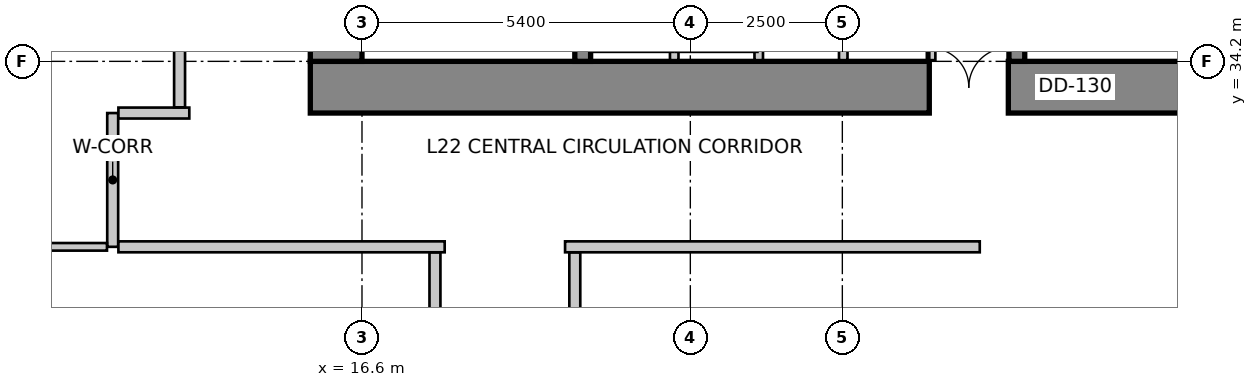
"""IFC4 building model, lengths in metres.
Left out: names, types, materials, properties, quantities, classifications, styles, units other than length and angle.
Written with IfcOpenShell. Run it as: python <this file> out.ifc"""

import sys

from ifc_helpers import new_model, si_unit, direction, frame, frame_2d, origin, place, context, subcontext, project, spatial, rectangle, extrude, source, transform, mapped, element, fill, save


model = new_model("IFC4")
c1 = context("Model", 3, precision=1e-05, world=origin(), true_north=direction((0.0, 1.0)))
c2 = subcontext(c1, "Body", "Model", "MODEL_VIEW")
j1 = project(units=[si_unit("LENGTHUNIT", "METRE"), si_unit("PLANEANGLEUNIT", "RADIAN")], contexts=[c1])
p1 = place(None, origin())
s1 = spatial("IfcSite", under=j1, at=p1, CompositionType="ELEMENT")
p2 = place(p1, origin())
s2 = spatial("IfcBuilding", under=s1, at=p2, CompositionType="ELEMENT")
p3 = place(p2, frame((0.0, 0.0, 91.0)))
s3 = spatial("IfcBuildingStorey", under=s2, at=p3, CompositionType="ELEMENT", Elevation=91.0)
p4 = place(p3, frame((15.75, 33.775, 0.0), z_axis=(0.0, 0.0, 1.0), x_axis=(1.0, 0.0, 0.0)))
e1 = element("IfcWall", 1, at=p4, inside=s3, PredefinedType="SHEAR", context=c2, shape_type="SweptSolid", body=[
    extrude(rectangle(XDim=16.1, YDim=0.85, at=frame_2d((8.05, 0.0))), origin(), (0.0, 0.0, 1.0), 4.0),
])
m1 = source(origin(), c2, "Body", "SweptSolid", [
    extrude(rectangle(XDim=1.3, YDim=2.15, at=frame_2d((0.65, 1.075))), frame((0.0, 0.435, 0.0), z_axis=(0.0, -1.0, 0.0), x_axis=(1.0, 0.0, 0.0)), (0.0, 0.0, 1.0), 0.87),
])
p5 = place(p4, frame((10.18, 0.0, 0.0)))
e2 = element("IfcOpeningElement", 2, at=p5, cuts=e1, PredefinedType="OPENING", context=c2, shape_type="MappedRepresentation", body=[
    mapped(m1, transform((0.0, 0.0, 0.0), scale=1.0)),
])
p6 = place(p3, frame((16.175, 34.2, 0.0), z_axis=(0.0, 0.0, 1.0), x_axis=(0.0, 1.0, 0.0)))
e3 = element("IfcWall", 3, at=p6, inside=s3, PredefinedType="SHEAR", context=c2, shape_type="SweptSolid", body=[
    extrude(rectangle(XDim=11.4, YDim=0.85, at=frame_2d((5.7, 0.0))), origin(), (0.0, 0.0, 1.0), 4.0),
])
m2 = source(origin(), c2, "Body", "SweptSolid", [
    extrude(rectangle(XDim=1.1, YDim=2.15, at=frame_2d((0.55, 1.075))), frame((0.0, 0.435, 0.0), z_axis=(0.0, -1.0, 0.0), x_axis=(1.0, 0.0, 0.0)), (0.0, 0.0, 1.0), 0.87),
])
p7 = place(p6, frame((7.15, 0.0, 0.0)))
e4 = element("IfcOpeningElement", 4, at=p7, cuts=e3, PredefinedType="OPENING", context=c2, shape_type="MappedRepresentation", body=[
    mapped(m2, transform((0.0, 0.0, 0.0), scale=1.0)),
])
p8 = place(p3, frame((20.23, 34.2, 0.0), z_axis=(0.0, 0.0, 1.0), x_axis=(0.0, 1.0, 0.0)))
e5 = element("IfcWall", 5, at=p8, inside=s3, PredefinedType="SHEAR", context=c2, shape_type="SweptSolid", body=[
    extrude(rectangle(XDim=9.06, YDim=0.26, at=frame_2d((4.53, 0.0))), origin(), (0.0, 0.0, 1.0), 4.0),
])
m3 = source(origin(), c2, "Body", "SweptSolid", [
    extrude(rectangle(XDim=1.1, YDim=2.15, at=frame_2d((0.55, 1.075))), frame((0.0, 0.14, 0.0), z_axis=(0.0, -1.0, 0.0), x_axis=(1.0, 0.0, 0.0)), (0.0, 0.0, 1.0), 0.28),
])
p9 = place(p8, frame((7.45, 0.0, 0.0)))
e6 = element("IfcOpeningElement", 6, at=p9, cuts=e5, PredefinedType="OPENING", context=c2, shape_type="MappedRepresentation", body=[
    mapped(m3, transform((0.0, 0.0, 0.0), scale=1.0)),
])
p10 = place(p3, frame((27.37, 34.2, 0.0), z_axis=(0.0, 0.0, 1.0), x_axis=(0.0, 1.0, 0.0)))
e7 = element("IfcWall", 7, at=p10, inside=s3, PredefinedType="SHEAR", context=c2, shape_type="SweptSolid", body=[
    extrude(rectangle(XDim=9.06, YDim=0.26, at=frame_2d((4.53, 0.0))), origin(), (0.0, 0.0, 1.0), 4.0),
])
p11 = place(p10, frame((7.45, 0.0, 0.0)))
e8 = element("IfcOpeningElement", 8, at=p11, cuts=e7, PredefinedType="OPENING", context=c2, shape_type="MappedRepresentation", body=[
    mapped(m3, transform((0.0, 0.0, 0.0), scale=1.0)),
])
p12 = place(p3, frame((13.269, 47.134, 0.0), z_axis=(0.0, 0.0, 1.0), x_axis=(-0.319920423265, -0.947444416722, 0.0)))
e9 = element("IfcWall", 9, at=p12, inside=s3, PredefinedType="SOLIDWALL", context=c2, shape_type="SweptSolid", body=[
    extrude(rectangle(XDim=16.135, YDim=0.3, at=frame_2d((8.067, 0.0))), origin(), (0.0, 0.0, 1.0), 3.75),
])
m4 = source(origin(), c2, "Body", "SweptSolid", [
    extrude(rectangle(XDim=2.8, YDim=2.4, at=frame_2d((1.4, 1.2))), frame((0.0, 0.16, 0.0), z_axis=(0.0, -1.0, 0.0), x_axis=(1.0, 0.0, 0.0)), (0.0, 0.0, 1.0), 0.32),
])
p13 = place(p12, frame((1.988, 0.0, 0.85)))
e10 = element("IfcOpeningElement", 10, at=p13, cuts=e9, PredefinedType="OPENING", context=c2, shape_type="MappedRepresentation", body=[
    mapped(m4, transform((0.0, 0.0, 0.0), scale=1.0)),
])
m5 = source(origin(), c2, "Body", "SweptSolid", [
    extrude(rectangle(XDim=2.4, YDim=2.2, at=frame_2d((1.2, 1.1))), frame((0.0, 0.16, 0.0), z_axis=(0.0, -1.0, 0.0), x_axis=(1.0, 0.0, 0.0)), (0.0, 0.0, 1.0), 0.32),
])
p14 = place(p12, frame((7.159, 0.0, 0.85)))
e11 = element("IfcOpeningElement", 11, at=p14, cuts=e9, PredefinedType="OPENING", context=c2, shape_type="MappedRepresentation", body=[
    mapped(m5, transform((0.0, 0.0, 0.0), scale=1.0)),
])
p15 = place(p12, frame((11.93, 0.0, 0.85)))
e12 = element("IfcOpeningElement", 12, at=p15, cuts=e9, PredefinedType="OPENING", context=c2, shape_type="MappedRepresentation", body=[
    mapped(m4, transform((0.0, 0.0, 0.0), scale=1.0)),
])
p16 = place(p3, frame((8.183, 31.833, 0.0), z_axis=(0.0, 0.0, 1.0), x_axis=(0.18216364648, -0.983268226834, 0.0)))
e13 = element("IfcWall", 13, at=p16, inside=s3, PredefinedType="SOLIDWALL", context=c2, shape_type="SweptSolid", body=[
    extrude(rectangle(XDim=26.678, YDim=0.3, at=frame_2d((13.339, 0.0))), origin(), (0.0, 0.0, 1.0), 3.75),
])
p17 = place(p16, frame((3.152, 0.0, 0.85)))
e14 = element("IfcOpeningElement", 14, at=p17, cuts=e13, PredefinedType="OPENING", context=c2, shape_type="MappedRepresentation", body=[
    mapped(m5, transform((0.0, 0.0, 0.0), scale=1.0)),
])
p18 = place(p16, frame((9.076, 0.0, 0.85)))
e15 = element("IfcOpeningElement", 15, at=p18, cuts=e13, PredefinedType="OPENING", context=c2, shape_type="MappedRepresentation", body=[
    mapped(m5, transform((0.0, 0.0, 0.0), scale=1.0)),
])
p19 = place(p16, frame((13.847, 0.0, 0.85)))
e16 = element("IfcOpeningElement", 16, at=p19, cuts=e13, PredefinedType="OPENING", context=c2, shape_type="MappedRepresentation", body=[
    mapped(m5, transform((0.0, 0.0, 0.0), scale=1.0)),
])
p20 = place(p16, frame((18.172, 0.0, 0.85)))
e17 = element("IfcOpeningElement", 17, at=p20, cuts=e13, PredefinedType="OPENING", context=c2, shape_type="MappedRepresentation", body=[
    mapped(m4, transform((0.0, 0.0, 0.0), scale=1.0)),
])
p21 = place(p16, frame((22.896, 0.0, 0.85)))
e18 = element("IfcOpeningElement", 18, at=p21, cuts=e13, PredefinedType="OPENING", context=c2, shape_type="MappedRepresentation", body=[
    mapped(m5, transform((0.0, 0.0, 0.0), scale=1.0)),
])
for number, where, z_axis, x_axis in (
    (19, (25.96, 34.22, 0.0), (0.0, 0.0, 1.0), (0.0, 1.0, 0.0)),
    (20, (21.735, 34.22, 0.0), (0.0, 0.0, 1.0), (0.0, 1.0, 0.0)),
    (21, (23.125, 34.22, 0.0), (0.0, 0.0, 1.0), (0.0, 1.0, 0.0)),
    (22, (24.515, 34.22, 0.0), (0.0, 0.0, 1.0), (0.0, 1.0, 0.0)),
):
    element("IfcWall", number, at=place(p3, frame(where, z_axis=z_axis, x_axis=x_axis)), inside=s3, PredefinedType="SOLIDWALL", context=c2, shape_type="SweptSolid", body=[
        extrude(rectangle(XDim=1.62, YDim=0.14, at=frame_2d((0.81, 0.0))), origin(), (0.0, 0.0, 1.0), 3.042),
    ])
p22 = place(p3, frame((12.5, 31.15, 0.0), z_axis=(0.0, 0.0, 1.0), x_axis=(0.0, 1.0, 0.0)))
e23 = element("IfcWall", 23, at=p22, inside=s3, PredefinedType="PARTITIONING", context=c2, shape_type="SweptSolid", body=[
    extrude(rectangle(XDim=2.2, YDim=0.18, at=frame_2d((1.1, 0.0))), origin(), (0.0, 0.0, 1.0), 3.419),
])
p23 = place(p3, frame((12.594, 33.35, 0.0), z_axis=(0.0, 0.0, 1.0), x_axis=(1.0, 0.0, 0.0)))
e24 = element("IfcWall", 24, at=p23, inside=s3, PredefinedType="PARTITIONING", context=c2, shape_type="SweptSolid", body=[
    extrude(rectangle(XDim=1.166, YDim=0.18, at=frame_2d((0.583, 0.0))), origin(), (0.0, 0.0, 1.0), 3.75),
])
p24 = place(p3, frame((17.96, 31.15, 0.0), z_axis=(0.0, 0.0, 1.0), x_axis=(-1.0, 0.0, 0.0)))
e25 = element("IfcWall", 25, at=p24, inside=s3, PredefinedType="PARTITIONING", context=c2, shape_type="SweptSolid", body=[
    extrude(rectangle(XDim=5.366, YDim=0.18, at=frame_2d((2.683, 0.0))), origin(), (0.0, 0.0, 1.0), 3.419),
])
p25 = place(p3, frame((26.76, 31.15, 0.0), z_axis=(0.0, 0.0, 1.0), x_axis=(-1.0, 0.0, 0.0)))
e26 = element("IfcWall", 26, at=p25, inside=s3, PredefinedType="PARTITIONING", context=c2, shape_type="SweptSolid", body=[
    extrude(rectangle(XDim=6.82, YDim=0.18, at=frame_2d((3.41, 0.0))), origin(), (0.0, 0.0, 1.0), 3.419),
])
p26 = place(p3, frame((13.6, 33.444, 0.0), z_axis=(0.0, 0.0, 1.0), x_axis=(0.0, 1.0, 0.0)))
e27 = element("IfcWall", 27, at=p26, inside=s3, PredefinedType="PARTITIONING", context=c2, shape_type="SweptSolid", body=[
    extrude(rectangle(XDim=13.896, YDim=0.18, at=frame_2d((6.948, 0.0))), origin(), (0.0, 0.0, 1.0), 2.892),
])
m6 = source(origin(), c2, "Body", "SweptSolid", [
    extrude(rectangle(XDim=0.9, YDim=2.15, at=frame_2d((0.45, 1.075))), frame((0.0, 0.1, 0.0), z_axis=(0.0, -1.0, 0.0), x_axis=(1.0, 0.0, 0.0)), (0.0, 0.0, 1.0), 0.2),
])
p27 = place(p26, frame((4.144, 0.0, 0.0)))
e28 = element("IfcOpeningElement", 28, at=p27, cuts=e27, PredefinedType="OPENING", context=c2, shape_type="MappedRepresentation", body=[
    mapped(m6, transform((0.0, 0.0, 0.0), scale=1.0)),
])
p28 = place(p3, frame((12.406, 31.15, 0.0), z_axis=(0.0, 0.0, 1.0), x_axis=(-1.0, 0.0, 0.0)))
e29 = element("IfcWall", 29, at=p28, inside=s3, PredefinedType="PARTITIONING", context=c2, shape_type="SweptSolid", body=[
    extrude(rectangle(XDim=3.979, YDim=0.125, at=frame_2d((1.99, 0.0))), origin(), (0.0, 0.0, 1.0), 2.892),
])
p29 = place(p3, frame((17.8, 23.84, 0.0), z_axis=(0.0, 0.0, 1.0), x_axis=(0.0, 1.0, 0.0)))
e30 = element("IfcWall", 30, at=p29, inside=s3, PredefinedType="PARTITIONING", context=c2, shape_type="SweptSolid", body=[
    extrude(rectangle(XDim=7.216, YDim=0.18, at=frame_2d((3.608, 0.0))), origin(), (0.0, 0.0, 1.0), 3.125),
])
p30 = place(p29, frame((3.097, 0.0, 0.0)))
e31 = element("IfcOpeningElement", 31, at=p30, cuts=e30, PredefinedType="OPENING", context=c2, shape_type="MappedRepresentation", body=[
    mapped(m6, transform((0.0, 0.0, 0.0), scale=1.0)),
])
p31 = place(p3, frame((20.1, 31.056, 0.0), z_axis=(0.0, 0.0, 1.0), x_axis=(0.0, -1.0, 0.0)))
e32 = element("IfcWall", 32, at=p31, inside=s3, PredefinedType="PARTITIONING", context=c2, shape_type="SweptSolid", body=[
    extrude(rectangle(XDim=7.216, YDim=0.18, at=frame_2d((3.608, 0.0))), origin(), (0.0, 0.0, 1.0), 3.125),
])
p32 = place(p31, frame((3.097, 0.0, 0.0)))
e33 = element("IfcOpeningElement", 33, at=p32, cuts=e32, PredefinedType="OPENING", context=c2, shape_type="MappedRepresentation", body=[
    mapped(m6, transform((0.0, 0.0, 0.0), scale=1.0)),
])
m7 = source(origin(), c2, "Body", "SweptSolid", [
    extrude(rectangle(XDim=1.3, YDim=2.15, at=frame_2d((0.65, 1.075))), frame((0.0, 0.025, 0.0), z_axis=(0.0, -1.0, 0.0), x_axis=(1.0, 0.0, 0.0)), (0.0, 0.0, 1.0), 0.05),
])
p33 = place(p5, origin())
e34 = element("IfcDoor", 34, at=p33, inside=s3, OperationType="DOUBLE_DOOR_SINGLE_SWING", PredefinedType="DOOR", context=c2, shape_type="MappedRepresentation", body=[
    mapped(m7, transform((0.0, 0.0, 0.0), scale=1.0)),
])
fill(e2, e34)
save(model, sys.argv[1])
